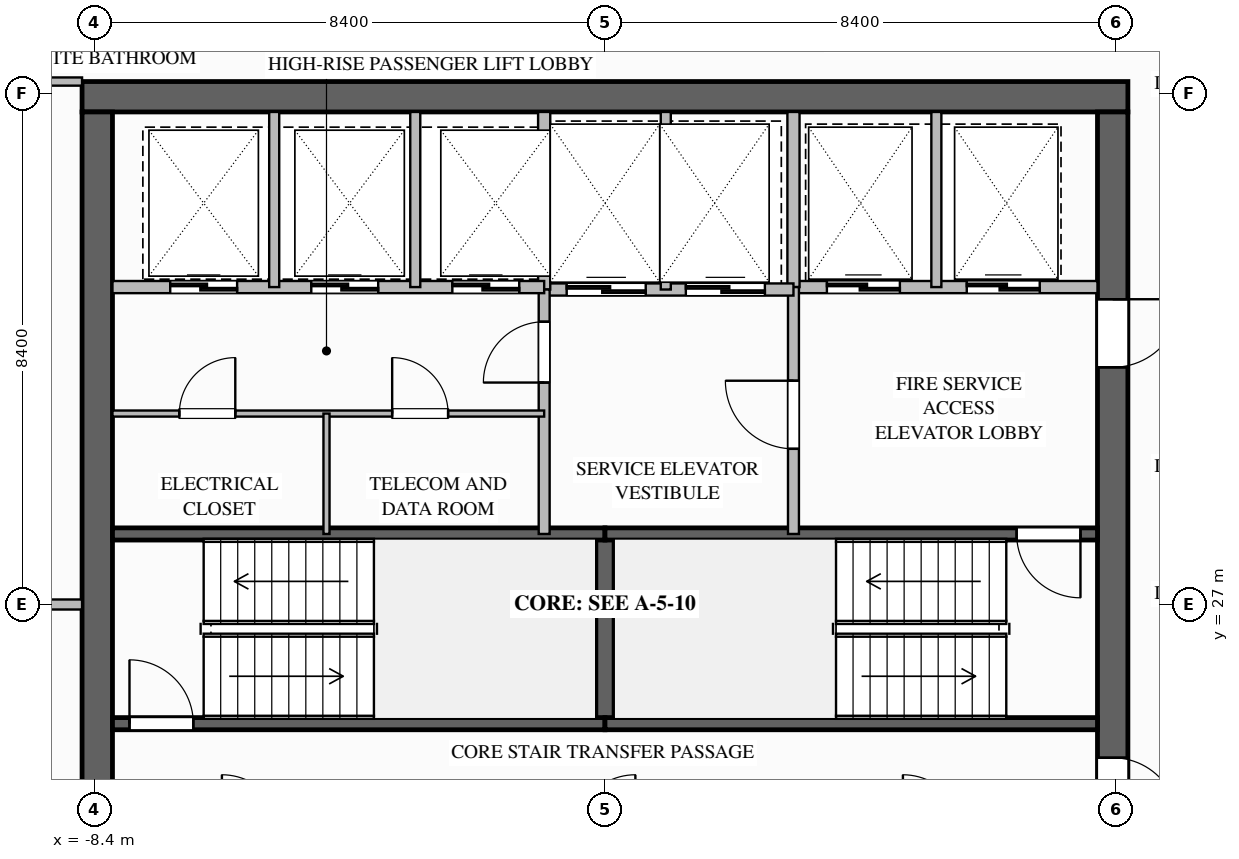
"""IFC4 building model, lengths in metres.
Left out: names, types, materials, properties, quantities, classifications, styles, units other than length and angle.
Written with IfcOpenShell. Run it as: python <this file> out.ifc"""

import sys

from ifc_helpers import new_model, si_unit, direction, frame, frame_2d, origin, place, context, subcontext, project, spatial, rectangle, extrude, element, fill, save


model = new_model("IFC4")
c1 = context("Model", 3, precision=1e-05, world=origin(), true_north=direction((0.0, 1.0)))
c2 = subcontext(c1, "Body", "Model", "MODEL_VIEW")
j1 = project(units=[si_unit("LENGTHUNIT", "METRE"), si_unit("PLANEANGLEUNIT", "RADIAN")], contexts=[c1])
p1 = place(None, origin())
s1 = spatial("IfcSite", under=j1, at=p1, CompositionType="ELEMENT")
p2 = place(p1, origin())
s2 = spatial("IfcBuilding", under=s1, at=p2, CompositionType="ELEMENT")
p3 = place(p2, frame((0.0, 0.0, 205.1)))
s3 = spatial("IfcBuildingStorey", under=s2, at=p3, CompositionType="ELEMENT", Elevation=205.1)
p4 = place(p3, frame((-8.6, 35.35, 0.0), z_axis=(0.0, 0.0, 1.0), x_axis=(1.0, 0.0, 0.0)))
e1 = element("IfcWall", 1, at=p4, inside=s3, PredefinedType="SHEAR", context=c2, shape_type="SweptSolid", body=[
    extrude(rectangle(XDim=17.2, YDim=0.5, at=frame_2d((8.6, 0.0))), origin(), (0.0, 0.0, 1.0), 3.6),
])
p5 = place(p3, frame((8.35, 35.1, 0.0), z_axis=(0.0, 0.0, 1.0), x_axis=(0.0, -1.0, 0.0)))
e2 = element("IfcWall", 2, at=p5, inside=s3, PredefinedType="SHEAR", context=c2, shape_type="SweptSolid", body=[
    extrude(rectangle(XDim=16.2, YDim=0.5, at=frame_2d((8.1, 0.0))), origin(), (0.0, 0.0, 1.0), 3.6),
])
p6 = place(p5, frame((3.08, 0.0, 0.0)))
e3 = element("IfcOpeningElement", 3, at=p6, cuts=e2, PredefinedType="OPENING", context=c2, shape_type="SweptSolid", body=[
    extrude(rectangle(XDim=1.12, YDim=2.1, at=frame_2d((0.56, 1.05))), frame((0.0, 0.26, 0.0), z_axis=(0.0, -1.0, 0.0), x_axis=(1.0, 0.0, 0.0)), (0.0, 0.0, 1.0), 0.52),
])
p7 = place(p5, frame((10.62, 0.0, 0.0)))
e4 = element("IfcOpeningElement", 4, at=p7, cuts=e2, PredefinedType="OPENING", context=c2, shape_type="SweptSolid", body=[
    extrude(rectangle(XDim=1.08, YDim=2.04, at=frame_2d((0.54, 1.02))), frame((0.0, 0.26, 0.0), z_axis=(0.0, -1.0, 0.0), x_axis=(1.0, 0.0, 0.0)), (0.0, 0.0, 1.0), 0.52),
])
p8 = place(p3, frame((-8.35, 18.9, 0.0), z_axis=(0.0, 0.0, 1.0), x_axis=(0.0, 1.0, 0.0)))
e5 = element("IfcWall", 5, at=p8, inside=s3, PredefinedType="SHEAR", context=c2, shape_type="SweptSolid", body=[
    extrude(rectangle(XDim=16.2, YDim=0.5, at=frame_2d((8.1, 0.0))), origin(), (0.0, 0.0, 1.0), 3.6),
])
p9 = place(p3, frame((0.0, 25.04, 0.0), z_axis=(0.0, 0.0, 1.0), x_axis=(0.0, 1.0, 0.0)))
e6 = element("IfcWall", 6, at=p9, inside=s3, PredefinedType="SOLIDWALL", context=c2, shape_type="SweptSolid", body=[
    extrude(rectangle(XDim=3.12, YDim=0.3, at=frame_2d((1.56, 0.0))), origin(), (0.0, 0.0, 1.0), 3.34),
])
p10 = place(p3, frame((-8.1, 25.04, 0.0), z_axis=(0.0, 0.0, 1.0), x_axis=(1.0, 0.0, 0.0)))
e7 = element("IfcWall", 7, at=p10, inside=s3, PredefinedType="SOLIDWALL", context=c2, shape_type="SweptSolid", body=[
    extrude(rectangle(XDim=8.1, YDim=0.2, at=frame_2d((4.05, 0.0))), origin(), (0.0, 0.0, 1.0), 3.34),
])
p11 = place(p10, frame((0.28, 0.0, 0.0)))
e8 = element("IfcOpeningElement", 8, at=p11, cuts=e7, PredefinedType="OPENING", context=c2, shape_type="SweptSolid", body=[
    extrude(rectangle(XDim=1.05, YDim=2.1, at=frame_2d((0.525, 1.05))), frame((0.0, 0.11, 0.0), z_axis=(0.0, -1.0, 0.0), x_axis=(1.0, 0.0, 0.0)), (0.0, 0.0, 1.0), 0.22),
])
for number, where, z_axis, x_axis in (
    (9, (-8.1, 28.16, 0.0), (0.0, 0.0, 1.0), (1.0, 0.0, 0.0)),
    (10, (0.0, 25.04, 0.0), (0.0, 0.0, 1.0), (1.0, 0.0, 0.0)),
):
    element("IfcWall", number, at=place(p3, frame(where, z_axis=z_axis, x_axis=x_axis)), inside=s3, PredefinedType="SOLIDWALL", context=c2, shape_type="SweptSolid", body=[
        extrude(rectangle(XDim=8.1, YDim=0.2, at=frame_2d((4.05, 0.0))), origin(), (0.0, 0.0, 1.0), 3.34),
    ])
p12 = place(p3, frame((8.1, 28.16, 0.0), z_axis=(0.0, 0.0, 1.0), x_axis=(-1.0, 0.0, 0.0)))
e11 = element("IfcWall", 11, at=p12, inside=s3, PredefinedType="SOLIDWALL", context=c2, shape_type="SweptSolid", body=[
    extrude(rectangle(XDim=8.1, YDim=0.2, at=frame_2d((4.05, 0.0))), origin(), (0.0, 0.0, 1.0), 3.34),
])
p13 = place(p12, frame((0.28, 0.0, 0.0)))
e12 = element("IfcOpeningElement", 12, at=p13, cuts=e11, PredefinedType="OPENING", context=c2, shape_type="SweptSolid", body=[
    extrude(rectangle(XDim=1.05, YDim=2.1, at=frame_2d((0.525, 1.05))), frame((0.0, 0.11, 0.0), z_axis=(0.0, -1.0, 0.0), x_axis=(1.0, 0.0, 0.0)), (0.0, 0.0, 1.0), 0.22),
])
p14 = place(p3, frame((3.1, 32.22, 0.0), z_axis=(0.0, 0.0, 1.0), x_axis=(1.0, 0.0, 0.0)))
e13 = element("IfcWall", 13, at=p14, inside=s3, PredefinedType="SOLIDWALL", context=c2, shape_type="SweptSolid", body=[
    extrude(rectangle(XDim=5.0, YDim=0.2, at=frame_2d((2.5, 0.0))), origin(), (0.0, 0.0, 1.0), 3.34),
])
p15 = place(p14, frame((0.55, 0.0, 0.0)))
e14 = element("IfcOpeningElement", 14, at=p15, cuts=e13, PredefinedType="OPENING", context=c2, shape_type="SweptSolid", body=[
    extrude(rectangle(XDim=1.2, YDim=2.2, at=frame_2d((0.6, 1.1))), frame((0.0, 0.11, 0.0), z_axis=(0.0, -1.0, 0.0), x_axis=(1.0, 0.0, 0.0)), (0.0, 0.0, 1.0), 0.22),
])
p16 = place(p14, frame((2.85, 0.0, 0.0)))
e15 = element("IfcOpeningElement", 15, at=p16, cuts=e13, PredefinedType="OPENING", context=c2, shape_type="SweptSolid", body=[
    extrude(rectangle(XDim=1.2, YDim=2.2, at=frame_2d((0.6, 1.1))), frame((0.0, 0.11, 0.0), z_axis=(0.0, -1.0, 0.0), x_axis=(1.0, 0.0, 0.0)), (0.0, 0.0, 1.0), 0.22),
])
p17 = place(p3, frame((3.1, 32.22, 0.0), z_axis=(0.0, 0.0, 1.0), x_axis=(0.0, 1.0, 0.0)))
e16 = element("IfcWall", 16, at=p17, inside=s3, PredefinedType="SOLIDWALL", context=c2, shape_type="SweptSolid", body=[
    extrude(rectangle(XDim=2.88, YDim=0.2, at=frame_2d((1.44, 0.0))), origin(), (0.0, 0.0, 1.0), 3.34),
])
p18 = place(p3, frame((5.45, 32.22, 0.0), z_axis=(0.0, 0.0, 1.0), x_axis=(0.0, 1.0, 0.0)))
e17 = element("IfcWall", 17, at=p18, inside=s3, PredefinedType="PARTITIONING", context=c2, shape_type="SweptSolid", body=[
    extrude(rectangle(XDim=2.88, YDim=0.165, at=frame_2d((1.44, 0.0))), origin(), (0.0, 0.0, 1.0), 3.34),
])
p19 = place(p3, frame((3.1, 28.16, 0.0), z_axis=(0.0, 0.0, 1.0), x_axis=(0.0, 1.0, 0.0)))
e18 = element("IfcWall", 18, at=p19, inside=s3, PredefinedType="SOLIDWALL", context=c2, shape_type="SweptSolid", body=[
    extrude(rectangle(XDim=4.06, YDim=0.18, at=frame_2d((2.03, 0.0))), origin(), (0.0, 0.0, 1.0), 3.34),
])
p20 = place(p19, frame((1.4, 0.0, 0.0)))
e19 = element("IfcOpeningElement", 19, at=p20, cuts=e18, PredefinedType="OPENING", context=c2, shape_type="SweptSolid", body=[
    extrude(rectangle(XDim=1.12, YDim=2.1, at=frame_2d((0.56, 1.05))), frame((0.0, 0.1, 0.0), z_axis=(0.0, -1.0, 0.0), x_axis=(1.0, 0.0, 0.0)), (0.0, 0.0, 1.0), 0.2),
])
p21 = place(p3, frame((-1.0, 32.18, 0.0), z_axis=(0.0, 0.0, 1.0), x_axis=(1.0, 0.0, 0.0)))
e20 = element("IfcWall", 20, at=p21, inside=s3, PredefinedType="SOLIDWALL", context=c2, shape_type="SweptSolid", body=[
    extrude(rectangle(XDim=4.1, YDim=0.2, at=frame_2d((2.05, 0.0))), origin(), (0.0, 0.0, 1.0), 3.34),
])
p22 = place(p21, frame((0.37, 0.0, 0.0)))
e21 = element("IfcOpeningElement", 21, at=p22, cuts=e20, PredefinedType="OPENING", context=c2, shape_type="SweptSolid", body=[
    extrude(rectangle(XDim=1.3, YDim=2.2, at=frame_2d((0.65, 1.1))), frame((0.0, 0.11, 0.0), z_axis=(0.0, -1.0, 0.0), x_axis=(1.0, 0.0, 0.0)), (0.0, 0.0, 1.0), 0.22),
])
p23 = place(p21, frame((2.33, 0.0, 0.0)))
e22 = element("IfcOpeningElement", 22, at=p23, cuts=e20, PredefinedType="OPENING", context=c2, shape_type="SweptSolid", body=[
    extrude(rectangle(XDim=1.3, YDim=2.2, at=frame_2d((0.65, 1.1))), frame((0.0, 0.11, 0.0), z_axis=(0.0, -1.0, 0.0), x_axis=(1.0, 0.0, 0.0)), (0.0, 0.0, 1.0), 0.22),
])
p24 = place(p3, frame((-1.0, 32.18, 0.0), z_axis=(0.0, 0.0, 1.0), x_axis=(0.0, 1.0, 0.0)))
e23 = element("IfcWall", 23, at=p24, inside=s3, PredefinedType="SOLIDWALL", context=c2, shape_type="SweptSolid", body=[
    extrude(rectangle(XDim=2.92, YDim=0.2, at=frame_2d((1.46, 0.0))), origin(), (0.0, 0.0, 1.0), 3.34),
])
p25 = place(p3, frame((1.0, 32.18, 0.0), z_axis=(0.0, 0.0, 1.0), x_axis=(0.0, 1.0, 0.0)))
e24 = element("IfcWall", 24, at=p25, inside=s3, PredefinedType="PARTITIONING", context=c2, shape_type="SweptSolid", body=[
    extrude(rectangle(XDim=2.92, YDim=0.165, at=frame_2d((1.46, 0.0))), origin(), (0.0, 0.0, 1.0), 3.34),
])
p26 = place(p3, frame((-1.0, 28.16, 0.0), z_axis=(0.0, 0.0, 1.0), x_axis=(0.0, 1.0, 0.0)))
e25 = element("IfcWall", 25, at=p26, inside=s3, PredefinedType="SOLIDWALL", context=c2, shape_type="SweptSolid", body=[
    extrude(rectangle(XDim=4.02, YDim=0.18, at=frame_2d((2.01, 0.0))), origin(), (0.0, 0.0, 1.0), 3.34),
])
p27 = place(p26, frame((2.49, 0.0, 0.0)))
e26 = element("IfcOpeningElement", 26, at=p27, cuts=e25, PredefinedType="OPENING", context=c2, shape_type="SweptSolid", body=[
    extrude(rectangle(XDim=1.0, YDim=2.1, at=frame_2d((0.5, 1.05))), frame((0.0, 0.1, 0.0), z_axis=(0.0, -1.0, 0.0), x_axis=(1.0, 0.0, 0.0)), (0.0, 0.0, 1.0), 0.2),
])
p28 = place(p3, frame((-8.1, 32.22, 0.0), z_axis=(0.0, 0.0, 1.0), x_axis=(1.0, 0.0, 0.0)))
e27 = element("IfcWall", 27, at=p28, inside=s3, PredefinedType="SOLIDWALL", context=c2, shape_type="SweptSolid", body=[
    extrude(rectangle(XDim=7.1, YDim=0.2, at=frame_2d((3.55, 0.0))), origin(), (0.0, 0.0, 1.0), 3.34),
])
p29 = place(p28, frame((0.95, 0.0, 0.0)))
e28 = element("IfcOpeningElement", 28, at=p29, cuts=e27, PredefinedType="OPENING", context=c2, shape_type="SweptSolid", body=[
    extrude(rectangle(XDim=1.1, YDim=2.2, at=frame_2d((0.55, 1.1))), frame((0.0, 0.11, 0.0), z_axis=(0.0, -1.0, 0.0), x_axis=(1.0, 0.0, 0.0)), (0.0, 0.0, 1.0), 0.22),
])
p30 = place(p28, frame((3.27, 0.0, 0.0)))
e29 = element("IfcOpeningElement", 29, at=p30, cuts=e27, PredefinedType="OPENING", context=c2, shape_type="SweptSolid", body=[
    extrude(rectangle(XDim=1.1, YDim=2.2, at=frame_2d((0.55, 1.1))), frame((0.0, 0.11, 0.0), z_axis=(0.0, -1.0, 0.0), x_axis=(1.0, 0.0, 0.0)), (0.0, 0.0, 1.0), 0.22),
])
p31 = place(p28, frame((5.59, 0.0, 0.0)))
e30 = element("IfcOpeningElement", 30, at=p31, cuts=e27, PredefinedType="OPENING", context=c2, shape_type="SweptSolid", body=[
    extrude(rectangle(XDim=1.1, YDim=2.2, at=frame_2d((0.55, 1.1))), frame((0.0, 0.11, 0.0), z_axis=(0.0, -1.0, 0.0), x_axis=(1.0, 0.0, 0.0)), (0.0, 0.0, 1.0), 0.22),
])
for number, where, z_axis, x_axis in (
    (31, (-5.44, 32.22, 0.0), (0.0, 0.0, 1.0), (0.0, 1.0, 0.0)),
    (32, (-3.12, 32.22, 0.0), (0.0, 0.0, 1.0), (0.0, 1.0, 0.0)),
):
    element("IfcWall", number, at=place(p3, frame(where, z_axis=z_axis, x_axis=x_axis)), inside=s3, PredefinedType="PARTITIONING", context=c2, shape_type="SweptSolid", body=[
        extrude(rectangle(XDim=2.88, YDim=0.165, at=frame_2d((1.44, 0.0))), origin(), (0.0, 0.0, 1.0), 3.34),
    ])
p32 = place(p3, frame((-8.1, 30.14, 0.0), z_axis=(0.0, 0.0, 1.0), x_axis=(1.0, 0.0, 0.0)))
e33 = element("IfcWall", 33, at=p32, inside=s3, PredefinedType="PARTITIONING", context=c2, shape_type="SweptSolid", body=[
    extrude(rectangle(XDim=7.1, YDim=0.1, at=frame_2d((3.55, 0.0))), origin(), (0.0, 0.0, 1.0), 3.34),
])
p33 = place(p32, frame((1.1, 0.0, 0.0)))
e34 = element("IfcOpeningElement", 34, at=p33, cuts=e33, PredefinedType="OPENING", context=c2, shape_type="SweptSolid", body=[
    extrude(rectangle(XDim=0.92, YDim=2.1, at=frame_2d((0.46, 1.05))), frame((0.0, 0.06, 0.0), z_axis=(0.0, -1.0, 0.0), x_axis=(1.0, 0.0, 0.0)), (0.0, 0.0, 1.0), 0.12),
])
p34 = place(p32, frame((4.6, 0.0, 0.0)))
e35 = element("IfcOpeningElement", 35, at=p34, cuts=e33, PredefinedType="OPENING", context=c2, shape_type="SweptSolid", body=[
    extrude(rectangle(XDim=0.92, YDim=2.1, at=frame_2d((0.46, 1.05))), frame((0.0, 0.06, 0.0), z_axis=(0.0, -1.0, 0.0), x_axis=(1.0, 0.0, 0.0)), (0.0, 0.0, 1.0), 0.12),
])
p35 = place(p3, frame((-4.58, 28.16, 0.0), z_axis=(0.0, 0.0, 1.0), x_axis=(0.0, 1.0, 0.0)))
e36 = element("IfcWall", 36, at=p35, inside=s3, PredefinedType="PARTITIONING", context=c2, shape_type="SweptSolid", body=[
    extrude(rectangle(XDim=1.98, YDim=0.1, at=frame_2d((0.99, 0.0))), origin(), (0.0, 0.0, 1.0), 3.34),
])
p36 = place(p3, frame((-16.2, 35.6, 0.0), z_axis=(0.0, 0.0, 1.0), x_axis=(1.0, 0.0, 0.0)))
e37 = element("IfcWall", 37, at=p36, inside=s3, PredefinedType="PARTITIONING", context=c2, shape_type="SweptSolid", body=[
    extrude(rectangle(XDim=7.6, YDim=0.135, at=frame_2d((3.8, 0.0))), origin(), (0.0, 0.0, 1.0), 2.717),
])
p37 = place(p36, frame((4.585, 0.0, 0.0)))
e38 = element("IfcOpeningElement", 38, at=p37, cuts=e37, PredefinedType="OPENING", context=c2, shape_type="SweptSolid", body=[
    extrude(rectangle(XDim=1.26, YDim=2.2, at=frame_2d((0.63, 1.1))), frame((0.0, 0.077, 0.0), z_axis=(0.0, -1.0, 0.0), x_axis=(1.0, 0.0, 0.0)), (0.0, 0.0, 1.0), 0.155),
])
p38 = place(p3, frame((-21.4, 27.0, 0.0), z_axis=(0.0, 0.0, 1.0), x_axis=(1.0, 0.0, 0.0)))
e39 = element("IfcWall", 39, at=p38, inside=s3, PredefinedType="PARTITIONING", context=c2, shape_type="SweptSolid", body=[
    extrude(rectangle(XDim=12.8, YDim=0.165, at=frame_2d((6.4, 0.0))), origin(), (0.0, 0.0, 1.0), 2.714),
])
p39 = place(p11, origin())
e40 = element("IfcDoor", 40, at=p39, inside=s3, OperationType="SINGLE_SWING_LEFT", PredefinedType="DOOR", context=c2, shape_type="SweptSolid", body=[
    extrude(rectangle(XDim=1.05, YDim=2.1, at=frame_2d((0.525, 1.05))), frame((0.0, 0.025, 0.0), z_axis=(0.0, -1.0, 0.0), x_axis=(1.0, 0.0, 0.0)), (0.0, 0.0, 1.0), 0.05),
])
fill(e8, e40)
p40 = place(p13, origin())
e41 = element("IfcDoor", 41, at=p40, inside=s3, OperationType="SINGLE_SWING_LEFT", PredefinedType="DOOR", context=c2, shape_type="SweptSolid", body=[
    extrude(rectangle(XDim=1.05, YDim=2.1, at=frame_2d((0.525, 1.05))), frame((0.0, 0.025, 0.0), z_axis=(0.0, -1.0, 0.0), x_axis=(1.0, 0.0, 0.0)), (0.0, 0.0, 1.0), 0.05),
])
fill(e12, e41)
p41 = place(p15, origin())
e42 = element("IfcDoor", 42, at=p41, inside=s3, OperationType="SLIDING_TO_LEFT", PredefinedType="DOOR", context=c2, shape_type="SweptSolid", body=[
    extrude(rectangle(XDim=1.2, YDim=2.2, at=frame_2d((0.6, 1.1))), frame((0.0, 0.025, 0.0), z_axis=(0.0, -1.0, 0.0), x_axis=(1.0, 0.0, 0.0)), (0.0, 0.0, 1.0), 0.05),
])
fill(e14, e42)
p42 = place(p16, origin())
e43 = element("IfcDoor", 43, at=p42, inside=s3, OperationType="SLIDING_TO_LEFT", PredefinedType="DOOR", context=c2, shape_type="SweptSolid", body=[
    extrude(rectangle(XDim=1.2, YDim=2.2, at=frame_2d((0.6, 1.1))), frame((0.0, 0.025, 0.0), z_axis=(0.0, -1.0, 0.0), x_axis=(1.0, 0.0, 0.0)), (0.0, 0.0, 1.0), 0.05),
])
fill(e15, e43)
p43 = place(p20, origin())
e44 = element("IfcDoor", 44, at=p43, inside=s3, OperationType="SINGLE_SWING_RIGHT", PredefinedType="DOOR", context=c2, shape_type="SweptSolid", body=[
    extrude(rectangle(XDim=1.12, YDim=2.1, at=frame_2d((0.56, 1.05))), frame((0.0, 0.025, 0.0), z_axis=(0.0, -1.0, 0.0), x_axis=(1.0, 0.0, 0.0)), (0.0, 0.0, 1.0), 0.05),
])
fill(e19, e44)
p44 = place(p6, origin())
e45 = element("IfcDoor", 45, at=p44, inside=s3, OperationType="SINGLE_SWING_LEFT", PredefinedType="DOOR", context=c2, shape_type="SweptSolid", body=[
    extrude(rectangle(XDim=1.12, YDim=2.1, at=frame_2d((0.56, 1.05))), frame((0.0, 0.025, 0.0), z_axis=(0.0, -1.0, 0.0), x_axis=(1.0, 0.0, 0.0)), (0.0, 0.0, 1.0), 0.05),
])
fill(e3, e45)
p45 = place(p22, origin())
e46 = element("IfcDoor", 46, at=p45, inside=s3, OperationType="SLIDING_TO_LEFT", PredefinedType="DOOR", context=c2, shape_type="SweptSolid", body=[
    extrude(rectangle(XDim=1.3, YDim=2.2, at=frame_2d((0.65, 1.1))), frame((0.0, 0.025, 0.0), z_axis=(0.0, -1.0, 0.0), x_axis=(1.0, 0.0, 0.0)), (0.0, 0.0, 1.0), 0.05),
])
fill(e21, e46)
p46 = place(p23, origin())
e47 = element("IfcDoor", 47, at=p46, inside=s3, OperationType="SLIDING_TO_LEFT", PredefinedType="DOOR", context=c2, shape_type="SweptSolid", body=[
    extrude(rectangle(XDim=1.3, YDim=2.2, at=frame_2d((0.65, 1.1))), frame((0.0, 0.025, 0.0), z_axis=(0.0, -1.0, 0.0), x_axis=(1.0, 0.0, 0.0)), (0.0, 0.0, 1.0), 0.05),
])
fill(e22, e47)
p47 = place(p27, origin())
e48 = element("IfcDoor", 48, at=p47, inside=s3, OperationType="SINGLE_SWING_LEFT", PredefinedType="DOOR", context=c2, shape_type="SweptSolid", body=[
    extrude(rectangle(XDim=1.0, YDim=2.1, at=frame_2d((0.5, 1.05))), frame((0.0, 0.025, 0.0), z_axis=(0.0, -1.0, 0.0), x_axis=(1.0, 0.0, 0.0)), (0.0, 0.0, 1.0), 0.05),
])
fill(e26, e48)
p48 = place(p29, origin())
e49 = element("IfcDoor", 49, at=p48, inside=s3, OperationType="SLIDING_TO_LEFT", PredefinedType="DOOR", context=c2, shape_type="SweptSolid", body=[
    extrude(rectangle(XDim=1.1, YDim=2.2, at=frame_2d((0.55, 1.1))), frame((0.0, 0.025, 0.0), z_axis=(0.0, -1.0, 0.0), x_axis=(1.0, 0.0, 0.0)), (0.0, 0.0, 1.0), 0.05),
])
fill(e28, e49)
p49 = place(p30, origin())
e50 = element("IfcDoor", 50, at=p49, inside=s3, OperationType="SLIDING_TO_LEFT", PredefinedType="DOOR", context=c2, shape_type="SweptSolid", body=[
    extrude(rectangle(XDim=1.1, YDim=2.2, at=frame_2d((0.55, 1.1))), frame((0.0, 0.025, 0.0), z_axis=(0.0, -1.0, 0.0), x_axis=(1.0, 0.0, 0.0)), (0.0, 0.0, 1.0), 0.05),
])
fill(e29, e50)
p50 = place(p31, origin())
e51 = element("IfcDoor", 51, at=p50, inside=s3, OperationType="SLIDING_TO_LEFT", PredefinedType="DOOR", context=c2, shape_type="SweptSolid", body=[
    extrude(rectangle(XDim=1.1, YDim=2.2, at=frame_2d((0.55, 1.1))), frame((0.0, 0.025, 0.0), z_axis=(0.0, -1.0, 0.0), x_axis=(1.0, 0.0, 0.0)), (0.0, 0.0, 1.0), 0.05),
])
fill(e30, e51)
p51 = place(p33, origin())
e52 = element("IfcDoor", 52, at=p51, inside=s3, OperationType="SINGLE_SWING_RIGHT", PredefinedType="DOOR", context=c2, shape_type="SweptSolid", body=[
    extrude(rectangle(XDim=0.92, YDim=2.1, at=frame_2d((0.46, 1.05))), frame((0.0, 0.025, 0.0), z_axis=(0.0, -1.0, 0.0), x_axis=(1.0, 0.0, 0.0)), (0.0, 0.0, 1.0), 0.05),
])
fill(e34, e52)
p52 = place(p34, origin())
e53 = element("IfcDoor", 53, at=p52, inside=s3, OperationType="SINGLE_SWING_LEFT", PredefinedType="DOOR", context=c2, shape_type="SweptSolid", body=[
    extrude(rectangle(XDim=0.92, YDim=2.1, at=frame_2d((0.46, 1.05))), frame((0.0, 0.025, 0.0), z_axis=(0.0, -1.0, 0.0), x_axis=(1.0, 0.0, 0.0)), (0.0, 0.0, 1.0), 0.05),
])
fill(e35, e53)
p53 = place(p7, origin())
e54 = element("IfcDoor", 54, at=p53, inside=s3, OperationType="SINGLE_SWING_RIGHT", PredefinedType="DOOR", context=c2, shape_type="SweptSolid", body=[
    extrude(rectangle(XDim=1.08, YDim=2.04, at=frame_2d((0.54, 1.02))), frame((0.0, 0.025, 0.0), z_axis=(0.0, -1.0, 0.0), x_axis=(1.0, 0.0, 0.0)), (0.0, 0.0, 1.0), 0.05),
])
fill(e4, e54)
save(model, sys.argv[1])
